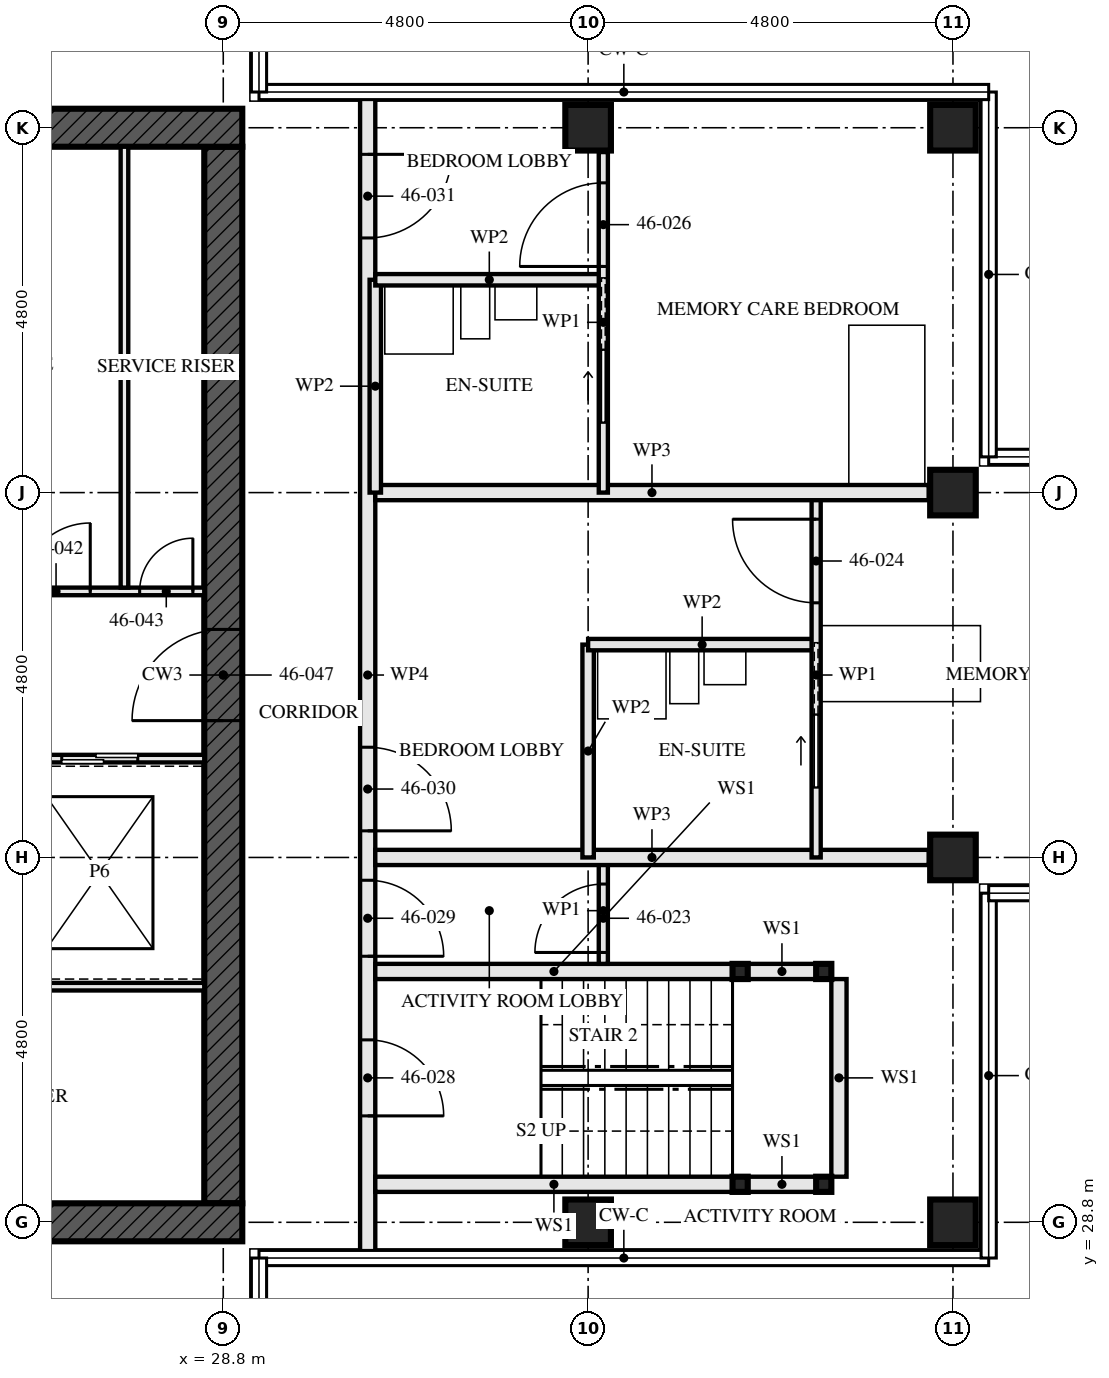
"""IFC4 building model, lengths in metres.
Left out: names, types, materials, properties, quantities, classifications, styles, units other than length and angle.
Written with IfcOpenShell. Run it as: python <this file> out.ifc"""

import sys

from ifc_helpers import new_model, si_unit, direction, frame, frame_2d, origin, origin_2d, place, context, subcontext, project, spatial, rectangle, hollow_rectangle, extrude, element, fill, save


model = new_model("IFC4")
c1 = context("Model", 3, precision=1e-05, world=origin(), true_north=direction((0.0, 1.0)))
c2 = subcontext(c1, "Body", "Model", "MODEL_VIEW")
j1 = project(units=[si_unit("LENGTHUNIT", "METRE"), si_unit("PLANEANGLEUNIT", "RADIAN")], contexts=[c1])
p1 = place(None, origin())
s1 = spatial("IfcSite", under=j1, at=p1, CompositionType="ELEMENT")
p2 = place(p1, origin())
s2 = spatial("IfcBuilding", under=s1, at=p2, CompositionType="ELEMENT")
p3 = place(p2, frame((0.0, 0.0, 169.0)))
s3 = spatial("IfcBuildingStorey", under=s2, at=p3, CompositionType="ELEMENT", Elevation=169.0)
for number, where, z_axis, x_axis in (
    (1, (33.6, 28.8, 0.0), (0.0, 0.0, 1.0), (0.0, 1.0, 0.0)),
    (2, (33.6, 43.2, 0.0), (0.0, 0.0, 1.0), (0.0, 1.0, 0.0)),
):
    element("IfcColumn", number, at=place(p3, frame(where, z_axis=z_axis, x_axis=x_axis)), inside=s3, PredefinedType="COLUMN", context=c2, shape_type="SweptSolid", body=[
        extrude(hollow_rectangle(XDim=0.6, YDim=0.6, WallThickness=0.08, at=origin_2d()), origin(), (0.0, 0.0, 1.0), 3.5),
    ])
for number, where, z_axis, x_axis in (
    (3, (38.4, 28.8, 0.0), (0.0, 0.0, 1.0), (0.0, 1.0, 0.0)),
    (4, (38.4, 33.6, 0.0), (0.0, 0.0, 1.0), (0.0, 1.0, 0.0)),
    (5, (38.4, 38.4, 0.0), (0.0, 0.0, 1.0), (0.0, 1.0, 0.0)),
    (6, (38.4, 43.2, 0.0), (0.0, 0.0, 1.0), (0.0, 1.0, 0.0)),
):
    element("IfcColumn", number, at=place(p3, frame(where, z_axis=z_axis, x_axis=x_axis)), inside=s3, PredefinedType="COLUMN", context=c2, shape_type="SweptSolid", body=[
        extrude(hollow_rectangle(XDim=0.6, YDim=0.6, WallThickness=0.06, at=origin_2d()), origin(), (0.0, 0.0, 1.0), 3.5),
    ])
p4 = place(p3, frame((14.15, 28.8, -0.17), z_axis=(0.0, 0.0, 1.0), x_axis=(1.0, 0.0, 0.0)))
e7 = element("IfcWall", 7, at=p4, inside=s3, PredefinedType="SHEAR", context=c2, shape_type="SweptSolid", body=[
    extrude(rectangle(XDim=14.9, YDim=0.5, at=frame_2d((7.45, 0.0))), origin(), (0.0, 0.0, 1.0), 3.5),
])
p5 = place(p4, frame((6.85, 0.0, 0.17)))
e8 = element("IfcOpeningElement", 8, at=p5, cuts=e7, PredefinedType="OPENING", context=c2, shape_type="SweptSolid", body=[
    extrude(rectangle(XDim=1.2, YDim=2.1, at=frame_2d((0.6, 1.05))), frame((0.0, 0.26, 0.0), z_axis=(0.0, -1.0, 0.0), x_axis=(1.0, 0.0, 0.0)), (0.0, 0.0, 1.0), 0.521),
])
p6 = place(p3, frame((29.05, 43.2, -0.17), z_axis=(0.0, 0.0, 1.0), x_axis=(-1.0, 0.0, 0.0)))
e9 = element("IfcWall", 9, at=p6, inside=s3, PredefinedType="SHEAR", context=c2, shape_type="SweptSolid", body=[
    extrude(rectangle(XDim=14.9, YDim=0.5, at=frame_2d((7.45, 0.0))), origin(), (0.0, 0.0, 1.0), 3.5),
])
p7 = place(p6, frame((6.85, 0.0, 0.17)))
e10 = element("IfcOpeningElement", 10, at=p7, cuts=e9, PredefinedType="OPENING", context=c2, shape_type="SweptSolid", body=[
    extrude(rectangle(XDim=1.2, YDim=2.1, at=frame_2d((0.6, 1.05))), frame((0.0, 0.26, 0.0), z_axis=(0.0, -1.0, 0.0), x_axis=(1.0, 0.0, 0.0)), (0.0, 0.0, 1.0), 0.521),
])
p8 = place(p3, frame((28.8, 29.05, -0.17), z_axis=(0.0, 0.0, 1.0), x_axis=(0.0, 1.0, 0.0)))
e11 = element("IfcWall", 11, at=p8, inside=s3, PredefinedType="SHEAR", context=c2, shape_type="SweptSolid", body=[
    extrude(rectangle(XDim=13.9, YDim=0.5, at=frame_2d((6.95, 0.0))), origin(), (0.0, 0.0, 1.0), 3.5),
])
p9 = place(p8, frame((6.35, 0.0, 0.17)))
e12 = element("IfcOpeningElement", 12, at=p9, cuts=e11, PredefinedType="OPENING", context=c2, shape_type="SweptSolid", body=[
    extrude(rectangle(XDim=1.2, YDim=2.1, at=frame_2d((0.6, 1.05))), frame((0.0, 0.26, 0.0), z_axis=(0.0, -1.0, 0.0), x_axis=(1.0, 0.0, 0.0)), (0.0, 0.0, 1.0), 0.521),
])
for number, where, z_axis, x_axis in (
    (13, (36.7, 29.3, 0.0), (0.0, 0.0, 1.0), (1.0, 0.0, 0.0)),
    (14, (36.7, 32.1, 0.0), (0.0, 0.0, 1.0), (1.0, 0.0, 0.0)),
    (15, (35.6, 29.3, 0.0), (0.0, 0.0, 1.0), (1.0, 0.0, 0.0)),
    (16, (35.6, 32.1, 0.0), (0.0, 0.0, 1.0), (1.0, 0.0, 0.0)),
):
    element("IfcColumn", number, at=place(p3, frame(where, z_axis=z_axis, x_axis=x_axis)), inside=s3, PredefinedType="COLUMN", context=c2, shape_type="SweptSolid", body=[
        extrude(hollow_rectangle(XDim=0.2, YDim=0.2, WallThickness=0.008, at=origin_2d()), origin(), (0.0, 0.0, 1.0), 3.33),
    ])
p10 = place(p3, frame((36.6, 29.3, 0.0), z_axis=(0.0, 0.0, 1.0), x_axis=(-1.0, 0.0, 0.0)))
e17 = element("IfcWall", 17, at=p10, inside=s3, PredefinedType="SOLIDWALL", context=c2, shape_type="SweptSolid", body=[
    extrude(rectangle(XDim=0.9, YDim=0.2, at=frame_2d((0.45, 0.0))), origin(), (0.0, 0.0, 1.0), 2.99),
])
p11 = place(p3, frame((35.5, 29.3, 0.0), z_axis=(0.0, 0.0, 1.0), x_axis=(-1.0, 0.0, 0.0)))
e18 = element("IfcWall", 18, at=p11, inside=s3, PredefinedType="SOLIDWALL", context=c2, shape_type="SweptSolid", body=[
    extrude(rectangle(XDim=4.7, YDim=0.2, at=frame_2d((2.35, 0.0))), origin(), (0.0, 0.0, 1.0), 2.99),
])
p12 = place(p3, frame((36.6, 32.1, 0.0), z_axis=(0.0, 0.0, 1.0), x_axis=(-1.0, 0.0, 0.0)))
e19 = element("IfcWall", 19, at=p12, inside=s3, PredefinedType="SOLIDWALL", context=c2, shape_type="SweptSolid", body=[
    extrude(rectangle(XDim=0.9, YDim=0.2, at=frame_2d((0.45, 0.0))), origin(), (0.0, 0.0, 1.0), 2.99),
])
p13 = place(p3, frame((35.5, 32.1, 0.0), z_axis=(0.0, 0.0, 1.0), x_axis=(-1.0, 0.0, 0.0)))
e20 = element("IfcWall", 20, at=p13, inside=s3, PredefinedType="SOLIDWALL", context=c2, shape_type="SweptSolid", body=[
    extrude(rectangle(XDim=4.7, YDim=0.2, at=frame_2d((2.35, 0.0))), origin(), (0.0, 0.0, 1.0), 2.99),
])
p14 = place(p3, frame((36.9, 29.4, 0.0), z_axis=(0.0, 0.0, 1.0), x_axis=(0.0, 1.0, 0.0)))
e21 = element("IfcWall", 21, at=p14, inside=s3, PredefinedType="SOLIDWALL", context=c2, shape_type="SweptSolid", body=[
    extrude(rectangle(XDim=2.6, YDim=0.2, at=frame_2d((1.3, 0.0))), origin(), (0.0, 0.0, 1.0), 3.33),
])
p15 = place(p3, frame((33.8, 32.2, 0.0), z_axis=(0.0, 0.0, 1.0), x_axis=(0.0, 1.0, 0.0)))
e22 = element("IfcWall", 22, at=p15, inside=s3, PredefinedType="PARTITIONING", context=c2, shape_type="SweptSolid", body=[
    extrude(rectangle(XDim=1.4, YDim=0.12, at=frame_2d((0.7, 0.0))), origin(), (0.0, 0.0, 1.0), 3.33),
])
p16 = place(p15, frame((0.15, 0.0, 0.0)))
e23 = element("IfcOpeningElement", 23, at=p16, cuts=e22, PredefinedType="OPENING", context=c2, shape_type="SweptSolid", body=[
    extrude(rectangle(XDim=0.9, YDim=2.1, at=frame_2d((0.45, 1.05))), frame((0.0, 0.071, 0.0), z_axis=(0.0, -1.0, 0.0), x_axis=(1.0, 0.0, 0.0)), (0.0, 0.0, 1.0), 0.141),
])
p17 = place(p3, frame((38.08, 33.6, 0.0), z_axis=(0.0, 0.0, 1.0), x_axis=(-1.0, 0.0, 0.0)))
e24 = element("IfcWall", 24, at=p17, inside=s3, PredefinedType="PARTITIONING", context=c2, shape_type="SweptSolid", body=[
    extrude(rectangle(XDim=7.28, YDim=0.2, at=frame_2d((3.64, 0.0))), origin(), (0.0, 0.0, 1.0), 2.55),
])
p18 = place(p3, frame((36.6, 36.4, 0.0), z_axis=(0.0, 0.0, 1.0), x_axis=(-1.0, 0.0, 0.0)))
e25 = element("IfcWall", 25, at=p18, inside=s3, PredefinedType="PARTITIONING", context=c2, shape_type="SweptSolid", body=[
    extrude(rectangle(XDim=3.0, YDim=0.15, at=frame_2d((1.5, 0.0))), origin(), (0.0, 0.0, 1.0), 3.33),
])
p19 = place(p3, frame((33.6, 33.6, 0.0), z_axis=(0.0, 0.0, 1.0), x_axis=(0.0, 1.0, 0.0)))
e26 = element("IfcWall", 26, at=p19, inside=s3, PredefinedType="PARTITIONING", context=c2, shape_type="SweptSolid", body=[
    extrude(rectangle(XDim=2.8, YDim=0.15, at=frame_2d((1.4, 0.0))), origin(), (0.0, 0.0, 1.0), 3.33),
])
p20 = place(p3, frame((36.6, 33.6, 0.0), z_axis=(0.0, 0.0, 1.0), x_axis=(0.0, 1.0, 0.0)))
e27 = element("IfcWall", 27, at=p20, inside=s3, PredefinedType="PARTITIONING", context=c2, shape_type="SweptSolid", body=[
    extrude(rectangle(XDim=4.8, YDim=0.12, at=frame_2d((2.4, 0.0))), origin(), (0.0, 0.0, 1.0), 3.33),
])
p21 = place(p20, frame((3.35, 0.0, 0.0)))
e28 = element("IfcOpeningElement", 28, at=p21, cuts=e27, PredefinedType="OPENING", context=c2, shape_type="SweptSolid", body=[
    extrude(rectangle(XDim=1.1, YDim=2.1, at=frame_2d((0.55, 1.05))), frame((0.0, 0.071, 0.0), z_axis=(0.0, -1.0, 0.0), x_axis=(1.0, 0.0, 0.0)), (0.0, 0.0, 1.0), 0.141),
])
p22 = place(p20, frame((0.925, 0.0, 0.0)))
e29 = element("IfcOpeningElement", 29, at=p22, cuts=e27, PredefinedType="OPENING", context=c2, shape_type="SweptSolid", body=[
    extrude(rectangle(XDim=0.95, YDim=2.1, at=frame_2d((0.475, 1.05))), frame((0.0, 0.071, 0.0), z_axis=(0.0, -1.0, 0.0), x_axis=(1.0, 0.0, 0.0)), (0.0, 0.0, 1.0), 0.141),
])
p23 = place(p3, frame((38.08, 38.4, 0.0), z_axis=(0.0, 0.0, 1.0), x_axis=(-1.0, 0.0, 0.0)))
e30 = element("IfcWall", 30, at=p23, inside=s3, PredefinedType="PARTITIONING", context=c2, shape_type="SweptSolid", body=[
    extrude(rectangle(XDim=7.28, YDim=0.2, at=frame_2d((3.64, 0.0))), origin(), (0.0, 0.0, 1.0), 2.55),
])
p24 = place(p3, frame((33.8, 41.2, 0.0), z_axis=(0.0, 0.0, 1.0), x_axis=(-1.0, 0.0, 0.0)))
e31 = element("IfcWall", 31, at=p24, inside=s3, PredefinedType="PARTITIONING", context=c2, shape_type="SweptSolid", body=[
    extrude(rectangle(XDim=3.0, YDim=0.15, at=frame_2d((1.5, 0.0))), origin(), (0.0, 0.0, 1.0), 3.33),
])
p25 = place(p3, frame((30.8, 38.4, 0.0), z_axis=(0.0, 0.0, 1.0), x_axis=(0.0, 1.0, 0.0)))
e32 = element("IfcWall", 32, at=p25, inside=s3, PredefinedType="PARTITIONING", context=c2, shape_type="SweptSolid", body=[
    extrude(rectangle(XDim=2.8, YDim=0.15, at=frame_2d((1.4, 0.0))), origin(), (0.0, 0.0, 1.0), 3.33),
])
p26 = place(p3, frame((33.8, 38.4, 0.0), z_axis=(0.0, 0.0, 1.0), x_axis=(0.0, 1.0, 0.0)))
e33 = element("IfcWall", 33, at=p26, inside=s3, PredefinedType="PARTITIONING", context=c2, shape_type="SweptSolid", body=[
    extrude(rectangle(XDim=4.48, YDim=0.12, at=frame_2d((2.24, 0.0))), origin(), (0.0, 0.0, 1.0), 3.33),
])
p27 = place(p26, frame((2.975, 0.0, 0.0)))
e34 = element("IfcOpeningElement", 34, at=p27, cuts=e33, PredefinedType="OPENING", context=c2, shape_type="SweptSolid", body=[
    extrude(rectangle(XDim=1.1, YDim=2.1, at=frame_2d((0.55, 1.05))), frame((0.0, 0.071, 0.0), z_axis=(0.0, -1.0, 0.0), x_axis=(1.0, 0.0, 0.0)), (0.0, 0.0, 1.0), 0.141),
])
p28 = place(p26, frame((0.925, 0.0, 0.0)))
e35 = element("IfcOpeningElement", 35, at=p28, cuts=e33, PredefinedType="OPENING", context=c2, shape_type="SweptSolid", body=[
    extrude(rectangle(XDim=0.95, YDim=2.1, at=frame_2d((0.475, 1.05))), frame((0.0, 0.071, 0.0), z_axis=(0.0, -1.0, 0.0), x_axis=(1.0, 0.0, 0.0)), (0.0, 0.0, 1.0), 0.141),
])
p29 = place(p3, frame((30.7, 28.35, 0.0), z_axis=(0.0, 0.0, 1.0), x_axis=(0.0, 1.0, 0.0)))
e36 = element("IfcWall", 36, at=p29, inside=s3, PredefinedType="PARTITIONING", context=c2, shape_type="SweptSolid", body=[
    extrude(rectangle(XDim=15.3, YDim=0.2, at=frame_2d((7.65, 0.0))), origin(), (0.0, 0.0, 1.0), 2.32),
])
p30 = place(p29, frame((1.85, 0.0, 0.0)))
e37 = element("IfcOpeningElement", 37, at=p30, cuts=e36, PredefinedType="OPENING", context=c2, shape_type="SweptSolid", body=[
    extrude(rectangle(XDim=1.0, YDim=2.1, at=frame_2d((0.5, 1.05))), frame((0.0, 0.111, 0.0), z_axis=(0.0, -1.0, 0.0), x_axis=(1.0, 0.0, 0.0)), (0.0, 0.0, 1.0), 0.221),
])
p31 = place(p29, frame((3.95, 0.0, 0.0)))
e38 = element("IfcOpeningElement", 38, at=p31, cuts=e36, PredefinedType="OPENING", context=c2, shape_type="SweptSolid", body=[
    extrude(rectangle(XDim=1.0, YDim=2.1, at=frame_2d((0.5, 1.05))), frame((0.0, 0.111, 0.0), z_axis=(0.0, -1.0, 0.0), x_axis=(1.0, 0.0, 0.0)), (0.0, 0.0, 1.0), 0.221),
])
p32 = place(p29, frame((5.6, 0.0, 0.0)))
e39 = element("IfcOpeningElement", 39, at=p32, cuts=e36, PredefinedType="OPENING", context=c2, shape_type="SweptSolid", body=[
    extrude(rectangle(XDim=1.1, YDim=2.1, at=frame_2d((0.55, 1.05))), frame((0.0, 0.111, 0.0), z_axis=(0.0, -1.0, 0.0), x_axis=(1.0, 0.0, 0.0)), (0.0, 0.0, 1.0), 0.221),
])
p33 = place(p29, frame((13.4, 0.0, 0.0)))
e40 = element("IfcOpeningElement", 40, at=p33, cuts=e36, PredefinedType="OPENING", context=c2, shape_type="SweptSolid", body=[
    extrude(rectangle(XDim=1.1, YDim=2.1, at=frame_2d((0.55, 1.05))), frame((0.0, 0.111, 0.0), z_axis=(0.0, -1.0, 0.0), x_axis=(1.0, 0.0, 0.0)), (0.0, 0.0, 1.0), 0.221),
])
p34 = place(p3, frame((27.5, 37.15, 0.0), z_axis=(0.0, 0.0, 1.0), x_axis=(0.0, 1.0, 0.0)))
e41 = element("IfcWall", 41, at=p34, inside=s3, PredefinedType="SOLIDWALL", context=c2, shape_type="SweptSolid", body=[
    extrude(rectangle(XDim=5.8, YDim=0.1, at=frame_2d((2.9, 0.0))), origin(), (0.0, 0.0, 1.0), 3.33),
])
p35 = place(p3, frame((23.05, 34.9, 0.0), z_axis=(0.0, 0.0, 1.0), x_axis=(1.0, 0.0, 0.0)))
e42 = element("IfcWall", 42, at=p35, inside=s3, PredefinedType="SOLIDWALL", context=c2, shape_type="SweptSolid", body=[
    extrude(rectangle(XDim=5.5, YDim=0.1, at=frame_2d((2.75, 0.0))), origin(), (0.0, 0.0, 1.0), 3.33),
])
p36 = place(p35, frame((0.85, 0.0, 0.0)))
e43 = element("IfcOpeningElement", 43, at=p36, cuts=e42, PredefinedType="OPENING", context=c2, shape_type="SweptSolid", body=[
    extrude(rectangle(XDim=1.0, YDim=2.1, at=frame_2d((0.5, 1.05))), frame((0.0, 0.061, 0.0), z_axis=(0.0, -1.0, 0.0), x_axis=(1.0, 0.0, 0.0)), (0.0, 0.0, 1.0), 0.121),
])
p37 = place(p35, frame((3.625, 0.0, 0.0)))
e44 = element("IfcOpeningElement", 44, at=p37, cuts=e42, PredefinedType="OPENING", context=c2, shape_type="SweptSolid", body=[
    extrude(rectangle(XDim=1.0, YDim=2.1, at=frame_2d((0.5, 1.05))), frame((0.0, 0.061, 0.0), z_axis=(0.0, -1.0, 0.0), x_axis=(1.0, 0.0, 0.0)), (0.0, 0.0, 1.0), 0.121),
])
p38 = place(p3, frame((22.65, 37.1, 0.0), z_axis=(0.0, 0.0, 1.0), x_axis=(1.0, 0.0, 0.0)))
e45 = element("IfcWall", 45, at=p38, inside=s3, PredefinedType="SOLIDWALL", context=c2, shape_type="SweptSolid", body=[
    extrude(rectangle(XDim=5.9, YDim=0.1, at=frame_2d((2.95, 0.0))), origin(), (0.0, 0.0, 1.0), 3.33),
])
p39 = place(p38, frame((3.5, 0.0, 0.0)))
e46 = element("IfcOpeningElement", 46, at=p39, cuts=e45, PredefinedType="OPENING", context=c2, shape_type="SweptSolid", body=[
    extrude(rectangle(XDim=0.9, YDim=2.1, at=frame_2d((0.45, 1.05))), frame((0.0, 0.061, 0.0), z_axis=(0.0, -1.0, 0.0), x_axis=(1.0, 0.0, 0.0)), (0.0, 0.0, 1.0), 0.121),
])
p40 = place(p38, frame((5.05, 0.0, 0.0)))
e47 = element("IfcOpeningElement", 47, at=p40, cuts=e45, PredefinedType="OPENING", context=c2, shape_type="SweptSolid", body=[
    extrude(rectangle(XDim=0.7, YDim=2.1, at=frame_2d((0.35, 1.05))), frame((0.0, 0.061, 0.0), z_axis=(0.0, -1.0, 0.0), x_axis=(1.0, 0.0, 0.0)), (0.0, 0.0, 1.0), 0.121),
])
p41 = place(p3, frame((23.15, 31.9, 0.0), z_axis=(0.0, 0.0, 1.0), x_axis=(1.0, 0.0, 0.0)))
e48 = element("IfcWall", 48, at=p41, inside=s3, PredefinedType="SOLIDWALL", context=c2, shape_type="SweptSolid", body=[
    extrude(rectangle(XDim=5.4, YDim=0.1, at=frame_2d((2.7, 0.0))), origin(), (0.0, 0.0, 1.0), 3.33),
])
p42 = place(p16, origin())
e49 = element("IfcDoor", 49, at=p42, inside=s3, OperationType="SINGLE_SWING_RIGHT", PredefinedType="DOOR", context=c2, shape_type="SweptSolid", body=[
    extrude(rectangle(XDim=0.9, YDim=2.1, at=frame_2d((0.45, 1.05))), frame((0.0, 0.022, 0.0), z_axis=(0.0, -1.0, 0.0), x_axis=(1.0, 0.0, 0.0)), (0.0, 0.0, 1.0), 0.044),
])
fill(e23, e49)
p43 = place(p21, origin())
e50 = element("IfcDoor", 50, at=p43, inside=s3, OperationType="SINGLE_SWING_LEFT", PredefinedType="DOOR", context=c2, shape_type="SweptSolid", body=[
    extrude(rectangle(XDim=1.1, YDim=2.1, at=frame_2d((0.55, 1.05))), frame((0.0, 0.022, 0.0), z_axis=(0.0, -1.0, 0.0), x_axis=(1.0, 0.0, 0.0)), (0.0, 0.0, 1.0), 0.044),
])
fill(e28, e50)
p44 = place(p22, origin())
e51 = element("IfcDoor", 51, at=p44, inside=s3, OperationType="SLIDING_TO_LEFT", PredefinedType="DOOR", context=c2, shape_type="SweptSolid", body=[
    extrude(rectangle(XDim=0.95, YDim=2.1, at=frame_2d((0.475, 1.05))), frame((0.0, 0.022, 0.0), z_axis=(0.0, -1.0, 0.0), x_axis=(1.0, 0.0, 0.0)), (0.0, 0.0, 1.0), 0.044),
])
fill(e29, e51)
p45 = place(p27, origin())
e52 = element("IfcDoor", 52, at=p45, inside=s3, OperationType="SINGLE_SWING_RIGHT", PredefinedType="DOOR", context=c2, shape_type="SweptSolid", body=[
    extrude(rectangle(XDim=1.1, YDim=2.1, at=frame_2d((0.55, 1.05))), frame((0.0, 0.022, 0.0), z_axis=(0.0, -1.0, 0.0), x_axis=(1.0, 0.0, 0.0)), (0.0, 0.0, 1.0), 0.044),
])
fill(e34, e52)
p46 = place(p28, origin())
e53 = element("IfcDoor", 53, at=p46, inside=s3, OperationType="SLIDING_TO_LEFT", PredefinedType="DOOR", context=c2, shape_type="SweptSolid", body=[
    extrude(rectangle(XDim=0.95, YDim=2.1, at=frame_2d((0.475, 1.05))), frame((0.0, 0.022, 0.0), z_axis=(0.0, -1.0, 0.0), x_axis=(1.0, 0.0, 0.0)), (0.0, 0.0, 1.0), 0.044),
])
fill(e35, e53)
p47 = place(p30, frame((1.0, 0.0, 0.0), z_axis=(0.0, 0.0, 1.0), x_axis=(-1.0, 0.0, 0.0)))
e54 = element("IfcDoor", 54, at=p47, inside=s3, OperationType="SINGLE_SWING_LEFT", PredefinedType="DOOR", context=c2, shape_type="SweptSolid", body=[
    extrude(rectangle(XDim=1.0, YDim=2.1, at=frame_2d((0.5, 1.05))), frame((0.0, 0.032, 0.0), z_axis=(0.0, -1.0, 0.0), x_axis=(1.0, 0.0, 0.0)), (0.0, 0.0, 1.0), 0.064),
])
fill(e37, e54)
p48 = place(p31, frame((1.0, 0.0, 0.0), z_axis=(0.0, 0.0, 1.0), x_axis=(-1.0, 0.0, 0.0)))
e55 = element("IfcDoor", 55, at=p48, inside=s3, OperationType="SINGLE_SWING_LEFT", PredefinedType="DOOR", context=c2, shape_type="SweptSolid", body=[
    extrude(rectangle(XDim=1.0, YDim=2.1, at=frame_2d((0.5, 1.05))), frame((0.0, 0.027, 0.0), z_axis=(0.0, -1.0, 0.0), x_axis=(1.0, 0.0, 0.0)), (0.0, 0.0, 1.0), 0.054),
])
fill(e38, e55)
p49 = place(p32, frame((1.1, 0.0, 0.0), z_axis=(0.0, 0.0, 1.0), x_axis=(-1.0, 0.0, 0.0)))
e56 = element("IfcDoor", 56, at=p49, inside=s3, OperationType="SINGLE_SWING_LEFT", PredefinedType="DOOR", context=c2, shape_type="SweptSolid", body=[
    extrude(rectangle(XDim=1.1, YDim=2.1, at=frame_2d((0.55, 1.05))), frame((0.0, 0.027, 0.0), z_axis=(0.0, -1.0, 0.0), x_axis=(1.0, 0.0, 0.0)), (0.0, 0.0, 1.0), 0.054),
])
fill(e39, e56)
p50 = place(p33, frame((1.1, 0.0, 0.0), z_axis=(0.0, 0.0, 1.0), x_axis=(-1.0, 0.0, 0.0)))
e57 = element("IfcDoor", 57, at=p50, inside=s3, OperationType="SINGLE_SWING_RIGHT", PredefinedType="DOOR", context=c2, shape_type="SweptSolid", body=[
    extrude(rectangle(XDim=1.1, YDim=2.1, at=frame_2d((0.55, 1.05))), frame((0.0, 0.027, 0.0), z_axis=(0.0, -1.0, 0.0), x_axis=(1.0, 0.0, 0.0)), (0.0, 0.0, 1.0), 0.054),
])
fill(e40, e57)
p51 = place(p37, origin())
e58 = element("IfcDoor", 58, at=p51, inside=s3, OperationType="SLIDING_TO_LEFT", PredefinedType="DOOR", context=c2, shape_type="SweptSolid", body=[
    extrude(rectangle(XDim=1.0, YDim=2.1, at=frame_2d((0.5, 1.05))), frame((0.0, 0.05, 0.0), z_axis=(0.0, -1.0, 0.0), x_axis=(1.0, 0.0, 0.0)), (0.0, 0.0, 1.0), 0.1),
])
fill(e44, e58)
p52 = place(p39, origin())
e59 = element("IfcDoor", 59, at=p52, inside=s3, OperationType="SINGLE_SWING_LEFT", PredefinedType="DOOR", context=c2, shape_type="SweptSolid", body=[
    extrude(rectangle(XDim=0.9, YDim=2.1, at=frame_2d((0.45, 1.05))), frame((0.0, 0.027, 0.0), z_axis=(0.0, -1.0, 0.0), x_axis=(1.0, 0.0, 0.0)), (0.0, 0.0, 1.0), 0.054),
])
fill(e46, e59)
p53 = place(p40, origin())
e60 = element("IfcDoor", 60, at=p53, inside=s3, OperationType="SINGLE_SWING_LEFT", PredefinedType="DOOR", context=c2, shape_type="SweptSolid", body=[
    extrude(rectangle(XDim=0.7, YDim=2.1, at=frame_2d((0.35, 1.05))), frame((0.0, 0.027, 0.0), z_axis=(0.0, -1.0, 0.0), x_axis=(1.0, 0.0, 0.0)), (0.0, 0.0, 1.0), 0.054),
])
fill(e47, e60)
p54 = place(p9, origin())
e61 = element("IfcDoor", 61, at=p54, inside=s3, OperationType="SINGLE_SWING_LEFT", PredefinedType="DOOR", context=c2, shape_type="SweptSolid", body=[
    extrude(rectangle(XDim=1.2, YDim=2.1, at=frame_2d((0.6, 1.05))), frame((0.0, 0.027, 0.0), z_axis=(0.0, -1.0, 0.0), x_axis=(1.0, 0.0, 0.0)), (0.0, 0.0, 1.0), 0.054),
])
fill(e12, e61)
save(model, sys.argv[1])
